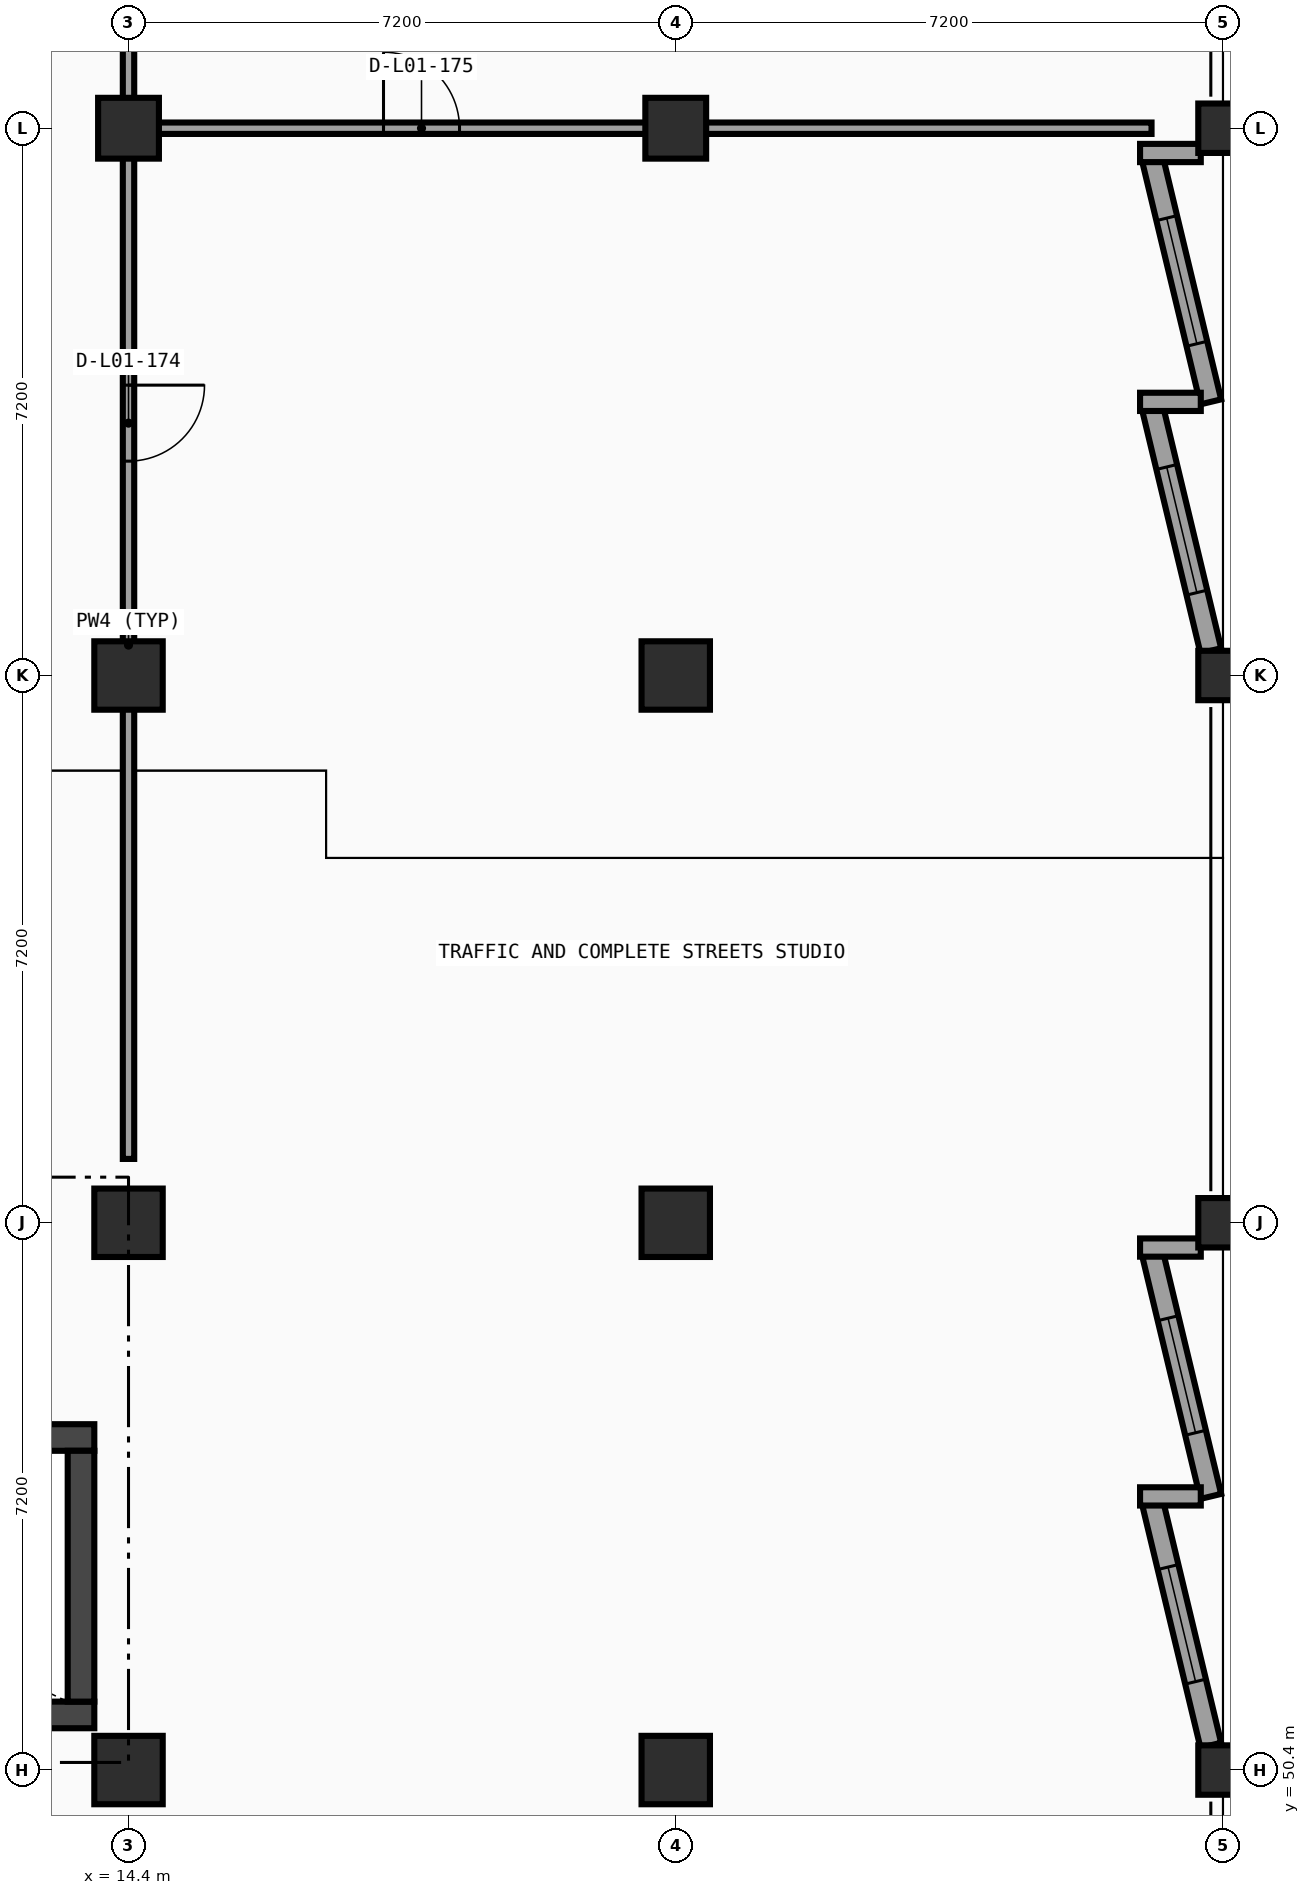
"""IFC4 building model, lengths in metres.
Left out: names, types, materials, properties, quantities, classifications, styles, units other than length and angle.
Written with IfcOpenShell. Run it as: python <this file> out.ifc"""

import sys

from ifc_helpers import new_model, si_unit, direction, frame, frame_2d, origin, origin_2d, place, context, subcontext, project, spatial, rectangle, extrude, element, fill, save


model = new_model("IFC4")
c1 = context("Model", 3, precision=1e-05, world=origin(), true_north=direction((0.0, 1.0)))
c2 = subcontext(c1, "Body", "Model", "MODEL_VIEW")
j1 = project(units=[si_unit("LENGTHUNIT", "METRE"), si_unit("PLANEANGLEUNIT", "RADIAN")], contexts=[c1])
p1 = place(None, origin())
s1 = spatial("IfcSite", under=j1, at=p1, CompositionType="ELEMENT")
p2 = place(p1, origin())
s2 = spatial("IfcBuilding", under=s1, at=p2, CompositionType="ELEMENT")
p3 = place(p2, frame((0.0, 0.0, 5.4)))
s3 = spatial("IfcBuildingStorey", under=s2, at=p3, CompositionType="ELEMENT", Elevation=5.4)
for number, where, z_axis, x_axis in (
    (1, (14.4, 50.4, 0.0), (0.0, 0.0, 1.0), (1.0, 0.0, 0.0)),
    (2, (14.4, 57.6, 0.0), (0.0, 0.0, 1.0), (1.0, 0.0, 0.0)),
    (3, (14.4, 64.8, 0.0), (0.0, 0.0, 1.0), (1.0, 0.0, 0.0)),
):
    element("IfcColumn", number, at=place(p3, frame(where, z_axis=z_axis, x_axis=x_axis)), inside=s3, PredefinedType="COLUMN", context=c2, shape_type="SweptSolid", body=[
        extrude(rectangle(XDim=0.9, YDim=0.9, at=origin_2d()), origin(), (0.0, 0.0, 1.0), 4.8),
    ])
p4 = place(p3, frame((14.4, 72.0, 0.0), z_axis=(0.0, 0.0, 1.0), x_axis=(1.0, 0.0, 0.0)))
e4 = element("IfcColumn", 4, at=p4, inside=s3, PredefinedType="COLUMN", context=c2, shape_type="SweptSolid", body=[
    extrude(rectangle(XDim=0.8, YDim=0.8, at=origin_2d()), origin(), (0.0, 0.0, 1.0), 4.8),
])
for number, where, z_axis, x_axis in (
    (5, (21.6, 50.4, 0.0), (0.0, 0.0, 1.0), (1.0, 0.0, 0.0)),
    (6, (21.6, 57.6, 0.0), (0.0, 0.0, 1.0), (1.0, 0.0, 0.0)),
    (7, (21.6, 64.8, 0.0), (0.0, 0.0, 1.0), (1.0, 0.0, 0.0)),
):
    element("IfcColumn", number, at=place(p3, frame(where, z_axis=z_axis, x_axis=x_axis)), inside=s3, PredefinedType="COLUMN", context=c2, shape_type="SweptSolid", body=[
        extrude(rectangle(XDim=0.9, YDim=0.9, at=origin_2d()), origin(), (0.0, 0.0, 1.0), 4.8),
    ])
p5 = place(p3, frame((21.6, 72.0, 0.0), z_axis=(0.0, 0.0, 1.0), x_axis=(1.0, 0.0, 0.0)))
e8 = element("IfcColumn", 8, at=p5, inside=s3, PredefinedType="COLUMN", context=c2, shape_type="SweptSolid", body=[
    extrude(rectangle(XDim=0.8, YDim=0.8, at=origin_2d()), origin(), (0.0, 0.0, 1.0), 4.8),
])
for number, where, z_axis, x_axis in (
    (9, (28.8, 50.4, 0.0), (0.0, 0.0, 1.0), (1.0, 0.0, 0.0)),
    (10, (28.8, 57.6, 0.0), (0.0, 0.0, 1.0), (1.0, 0.0, 0.0)),
    (11, (28.8, 64.8, 0.0), (0.0, 0.0, 1.0), (1.0, 0.0, 0.0)),
    (12, (28.8, 72.0, 0.0), (0.0, 0.0, 1.0), (1.0, 0.0, 0.0)),
):
    element("IfcColumn", number, at=place(p3, frame(where, z_axis=z_axis, x_axis=x_axis)), inside=s3, PredefinedType="COLUMN", context=c2, shape_type="SweptSolid", body=[
        extrude(rectangle(XDim=0.65, YDim=0.65, at=origin_2d()), origin(), (0.0, 0.0, 1.0), 4.8),
    ])
p6 = place(p3, frame((27.876, 71.582, 0.0), z_axis=(0.0, 0.0, 1.0), x_axis=(0.233395528793, -0.972381883387, 0.0)))
e13 = element("IfcWall", 13, at=p6, inside=s3, PredefinedType="SOLIDWALL", context=c2, shape_type="SweptSolid", body=[
    extrude(rectangle(XDim=3.272, YDim=0.28, at=frame_2d((1.636, 0.0))), origin(), (0.0, 0.0, 1.0), 3.976),
])
p7 = place(p6, frame((0.786, 0.0, 0.8)))
e14 = element("IfcOpeningElement", 14, at=p7, cuts=e13, PredefinedType="OPENING", context=c2, shape_type="SweptSolid", body=[
    extrude(rectangle(XDim=1.7, YDim=1.85, at=frame_2d((0.85, 0.925))), frame((0.0, 0.15, 0.0), z_axis=(0.0, -1.0, 0.0), x_axis=(1.0, 0.0, 0.0)), (0.0, 0.0, 1.0), 0.3),
])
p8 = place(p3, frame((27.709, 71.674, 0.0), z_axis=(0.0, 0.0, 1.0), x_axis=(1.0, 0.0, 0.0)))
e15 = element("IfcWall", 15, at=p8, inside=s3, PredefinedType="SOLIDWALL", context=c2, shape_type="SweptSolid", body=[
    extrude(rectangle(XDim=0.799, YDim=0.24, at=frame_2d((0.399, 0.0))), origin(), (0.0, 0.0, 1.0), 4.52),
])
p9 = place(p3, frame((27.876, 68.308, 0.0), z_axis=(0.0, 0.0, 1.0), x_axis=(0.233395528793, -0.972381883387, 0.0)))
e16 = element("IfcWall", 16, at=p9, inside=s3, PredefinedType="SOLIDWALL", context=c2, shape_type="SweptSolid", body=[
    extrude(rectangle(XDim=3.272, YDim=0.28, at=frame_2d((1.636, 0.0))), origin(), (0.0, 0.0, 1.0), 3.976),
])
p10 = place(p9, frame((0.786, 0.0, 0.8)))
e17 = element("IfcOpeningElement", 17, at=p10, cuts=e16, PredefinedType="OPENING", context=c2, shape_type="SweptSolid", body=[
    extrude(rectangle(XDim=1.7, YDim=1.85, at=frame_2d((0.85, 0.925))), frame((0.0, 0.15, 0.0), z_axis=(0.0, -1.0, 0.0), x_axis=(1.0, 0.0, 0.0)), (0.0, 0.0, 1.0), 0.3),
])
p11 = place(p3, frame((27.709, 68.4, 0.0), z_axis=(0.0, 0.0, 1.0), x_axis=(1.0, 0.0, 0.0)))
e18 = element("IfcWall", 18, at=p11, inside=s3, PredefinedType="SOLIDWALL", context=c2, shape_type="SweptSolid", body=[
    extrude(rectangle(XDim=0.799, YDim=0.24, at=frame_2d((0.399, 0.0))), origin(), (0.0, 0.0, 1.0), 4.52),
])
p12 = place(p3, frame((27.876, 57.182, 0.0), z_axis=(0.0, 0.0, 1.0), x_axis=(0.233395528793, -0.972381883387, 0.0)))
e19 = element("IfcWall", 19, at=p12, inside=s3, PredefinedType="SOLIDWALL", context=c2, shape_type="SweptSolid", body=[
    extrude(rectangle(XDim=3.272, YDim=0.28, at=frame_2d((1.636, 0.0))), origin(), (0.0, 0.0, 1.0), 3.976),
])
p13 = place(p12, frame((0.861, 0.0, 0.8)))
e20 = element("IfcOpeningElement", 20, at=p13, cuts=e19, PredefinedType="OPENING", context=c2, shape_type="SweptSolid", body=[
    extrude(rectangle(XDim=1.55, YDim=1.8, at=frame_2d((0.775, 0.9))), frame((0.0, 0.15, 0.0), z_axis=(0.0, -1.0, 0.0), x_axis=(1.0, 0.0, 0.0)), (0.0, 0.0, 1.0), 0.3),
])
p14 = place(p3, frame((27.709, 57.274, 0.0), z_axis=(0.0, 0.0, 1.0), x_axis=(1.0, 0.0, 0.0)))
e21 = element("IfcWall", 21, at=p14, inside=s3, PredefinedType="SOLIDWALL", context=c2, shape_type="SweptSolid", body=[
    extrude(rectangle(XDim=0.799, YDim=0.24, at=frame_2d((0.399, 0.0))), origin(), (0.0, 0.0, 1.0), 4.52),
])
p15 = place(p3, frame((27.876, 53.908, 0.0), z_axis=(0.0, 0.0, 1.0), x_axis=(0.233395528793, -0.972381883387, 0.0)))
e22 = element("IfcWall", 22, at=p15, inside=s3, PredefinedType="SOLIDWALL", context=c2, shape_type="SweptSolid", body=[
    extrude(rectangle(XDim=3.272, YDim=0.28, at=frame_2d((1.636, 0.0))), origin(), (0.0, 0.0, 1.0), 3.976),
])
p16 = place(p15, frame((0.861, 0.0, 0.8)))
e23 = element("IfcOpeningElement", 23, at=p16, cuts=e22, PredefinedType="OPENING", context=c2, shape_type="SweptSolid", body=[
    extrude(rectangle(XDim=1.55, YDim=1.8, at=frame_2d((0.775, 0.9))), frame((0.0, 0.15, 0.0), z_axis=(0.0, -1.0, 0.0), x_axis=(1.0, 0.0, 0.0)), (0.0, 0.0, 1.0), 0.3),
])
p17 = place(p3, frame((27.709, 54.0, 0.0), z_axis=(0.0, 0.0, 1.0), x_axis=(1.0, 0.0, 0.0)))
e24 = element("IfcWall", 24, at=p17, inside=s3, PredefinedType="SOLIDWALL", context=c2, shape_type="SweptSolid", body=[
    extrude(rectangle(XDim=0.799, YDim=0.24, at=frame_2d((0.399, 0.0))), origin(), (0.0, 0.0, 1.0), 4.52),
])
for number, where, z_axis, x_axis in (
    (25, (4.65, 51.125, 0.0), (0.0, 0.0, 1.0), (1.0, 0.0, 0.0)),
    (26, (13.95, 54.775, 0.0), (0.0, 0.0, 1.0), (-1.0, 0.0, 0.0)),
):
    element("IfcWall", number, at=place(p3, frame(where, z_axis=z_axis, x_axis=x_axis)), inside=s3, PredefinedType="SHEAR", context=c2, shape_type="SweptSolid", body=[
        extrude(rectangle(XDim=9.3, YDim=0.35, at=frame_2d((4.65, 0.0))), origin(), (0.0, 0.0, 1.0), 4.52),
    ])
p18 = place(p3, frame((13.775, 51.3, 0.0), z_axis=(0.0, 0.0, 1.0), x_axis=(0.0, 1.0, 0.0)))
e27 = element("IfcWall", 27, at=p18, inside=s3, PredefinedType="SHEAR", context=c2, shape_type="SweptSolid", body=[
    extrude(rectangle(XDim=3.3, YDim=0.35, at=frame_2d((1.65, 0.0))), origin(), (0.0, 0.0, 1.0), 4.52),
])
p19 = place(p3, frame((14.4, 58.44, 0.0), z_axis=(0.0, 0.0, 1.0), x_axis=(0.0, 1.0, 0.0)))
e28 = element("IfcWall", 28, at=p19, inside=s3, PredefinedType="PARTITIONING", context=c2, shape_type="SweptSolid", body=[
    extrude(rectangle(XDim=13.52, YDim=0.15, at=frame_2d((6.76, 0.0))), origin(), (0.0, 0.0, 1.0), 3.801),
])
p20 = place(p19, frame((9.18, 0.0, 0.0)))
e29 = element("IfcOpeningElement", 29, at=p20, cuts=e28, PredefinedType="OPENING", context=c2, shape_type="SweptSolid", body=[
    extrude(rectangle(XDim=1.0, YDim=2.1, at=frame_2d((0.5, 1.05))), frame((0.0, 0.085, 0.0), z_axis=(0.0, -1.0, 0.0), x_axis=(1.0, 0.0, 0.0)), (0.0, 0.0, 1.0), 0.17),
])
p21 = place(p3, frame((14.44, 72.0, 0.0), z_axis=(0.0, 0.0, 1.0), x_axis=(1.0, 0.0, 0.0)))
e30 = element("IfcWall", 30, at=p21, inside=s3, PredefinedType="PARTITIONING", context=c2, shape_type="SweptSolid", body=[
    extrude(rectangle(XDim=13.42, YDim=0.15, at=frame_2d((6.71, 0.0))), origin(), (0.0, 0.0, 1.0), 3.801),
])
p22 = place(p21, frame((3.315, 0.0, 0.0)))
e31 = element("IfcOpeningElement", 31, at=p22, cuts=e30, PredefinedType="OPENING", context=c2, shape_type="SweptSolid", body=[
    extrude(rectangle(XDim=1.0, YDim=2.1, at=frame_2d((0.5, 1.05))), frame((0.0, 0.085, 0.0), z_axis=(0.0, -1.0, 0.0), x_axis=(1.0, 0.0, 0.0)), (0.0, 0.0, 1.0), 0.17),
])
p23 = place(p3, frame((14.4, 72.04, 0.0), z_axis=(0.0, 0.0, 1.0), x_axis=(0.0, 1.0, 0.0)))
e32 = element("IfcWall", 32, at=p23, inside=s3, PredefinedType="PARTITIONING", context=c2, shape_type="SweptSolid", body=[
    extrude(rectangle(XDim=14.32, YDim=0.15, at=frame_2d((7.16, 0.0))), origin(), (0.0, 0.0, 1.0), 3.801),
])
p24 = place(p23, frame((3.54, 0.0, 0.0)))
e33 = element("IfcOpeningElement", 33, at=p24, cuts=e32, PredefinedType="OPENING", context=c2, shape_type="SweptSolid", body=[
    extrude(rectangle(XDim=1.0, YDim=2.1, at=frame_2d((0.5, 1.05))), frame((0.0, 0.085, 0.0), z_axis=(0.0, -1.0, 0.0), x_axis=(1.0, 0.0, 0.0)), (0.0, 0.0, 1.0), 0.17),
])
p25 = place(p23, frame((9.78, 0.0, 0.0)))
e34 = element("IfcOpeningElement", 34, at=p25, cuts=e32, PredefinedType="OPENING", context=c2, shape_type="SweptSolid", body=[
    extrude(rectangle(XDim=1.0, YDim=2.1, at=frame_2d((0.5, 1.05))), frame((0.0, 0.085, 0.0), z_axis=(0.0, -1.0, 0.0), x_axis=(1.0, 0.0, 0.0)), (0.0, 0.0, 1.0), 0.17),
])
p26 = place(p7, origin())
e35 = element("IfcWindow", 35, at=p26, inside=s3, PartitioningType="SINGLE_PANEL", PredefinedType="WINDOW", context=c2, shape_type="SweptSolid", body=[
    extrude(rectangle(XDim=1.7, YDim=1.85, at=frame_2d((0.85, 0.925))), frame((0.0, 0.03, 0.0), z_axis=(0.0, -1.0, 0.0), x_axis=(1.0, 0.0, 0.0)), (0.0, 0.0, 1.0), 0.06),
])
fill(e14, e35)
p27 = place(p10, origin())
e36 = element("IfcWindow", 36, at=p27, inside=s3, PartitioningType="SINGLE_PANEL", PredefinedType="WINDOW", context=c2, shape_type="SweptSolid", body=[
    extrude(rectangle(XDim=1.7, YDim=1.85, at=frame_2d((0.85, 0.925))), frame((0.0, 0.03, 0.0), z_axis=(0.0, -1.0, 0.0), x_axis=(1.0, 0.0, 0.0)), (0.0, 0.0, 1.0), 0.06),
])
fill(e17, e36)
p28 = place(p13, origin())
e37 = element("IfcWindow", 37, at=p28, inside=s3, PartitioningType="SINGLE_PANEL", PredefinedType="WINDOW", context=c2, shape_type="SweptSolid", body=[
    extrude(rectangle(XDim=1.55, YDim=1.8, at=frame_2d((0.775, 0.9))), frame((0.0, 0.03, 0.0), z_axis=(0.0, -1.0, 0.0), x_axis=(1.0, 0.0, 0.0)), (0.0, 0.0, 1.0), 0.06),
])
fill(e20, e37)
p29 = place(p16, origin())
e38 = element("IfcWindow", 38, at=p29, inside=s3, PartitioningType="SINGLE_PANEL", PredefinedType="WINDOW", context=c2, shape_type="SweptSolid", body=[
    extrude(rectangle(XDim=1.55, YDim=1.8, at=frame_2d((0.775, 0.9))), frame((0.0, 0.03, 0.0), z_axis=(0.0, -1.0, 0.0), x_axis=(1.0, 0.0, 0.0)), (0.0, 0.0, 1.0), 0.06),
])
fill(e23, e38)
p30 = place(p20, origin())
e39 = element("IfcDoor", 39, at=p30, inside=s3, OperationType="SINGLE_SWING_RIGHT", PredefinedType="DOOR", context=c2, shape_type="SweptSolid", body=[
    extrude(rectangle(XDim=1.0, YDim=2.1, at=frame_2d((0.5, 1.05))), frame((0.0, 0.025, 0.0), z_axis=(0.0, -1.0, 0.0), x_axis=(1.0, 0.0, 0.0)), (0.0, 0.0, 1.0), 0.05),
])
fill(e29, e39)
p31 = place(p22, origin())
e40 = element("IfcDoor", 40, at=p31, inside=s3, OperationType="SINGLE_SWING_LEFT", PredefinedType="DOOR", context=c2, shape_type="SweptSolid", body=[
    extrude(rectangle(XDim=1.0, YDim=2.1, at=frame_2d((0.5, 1.05))), frame((0.0, 0.025, 0.0), z_axis=(0.0, -1.0, 0.0), x_axis=(1.0, 0.0, 0.0)), (0.0, 0.0, 1.0), 0.05),
])
fill(e31, e40)
save(model, sys.argv[1])
